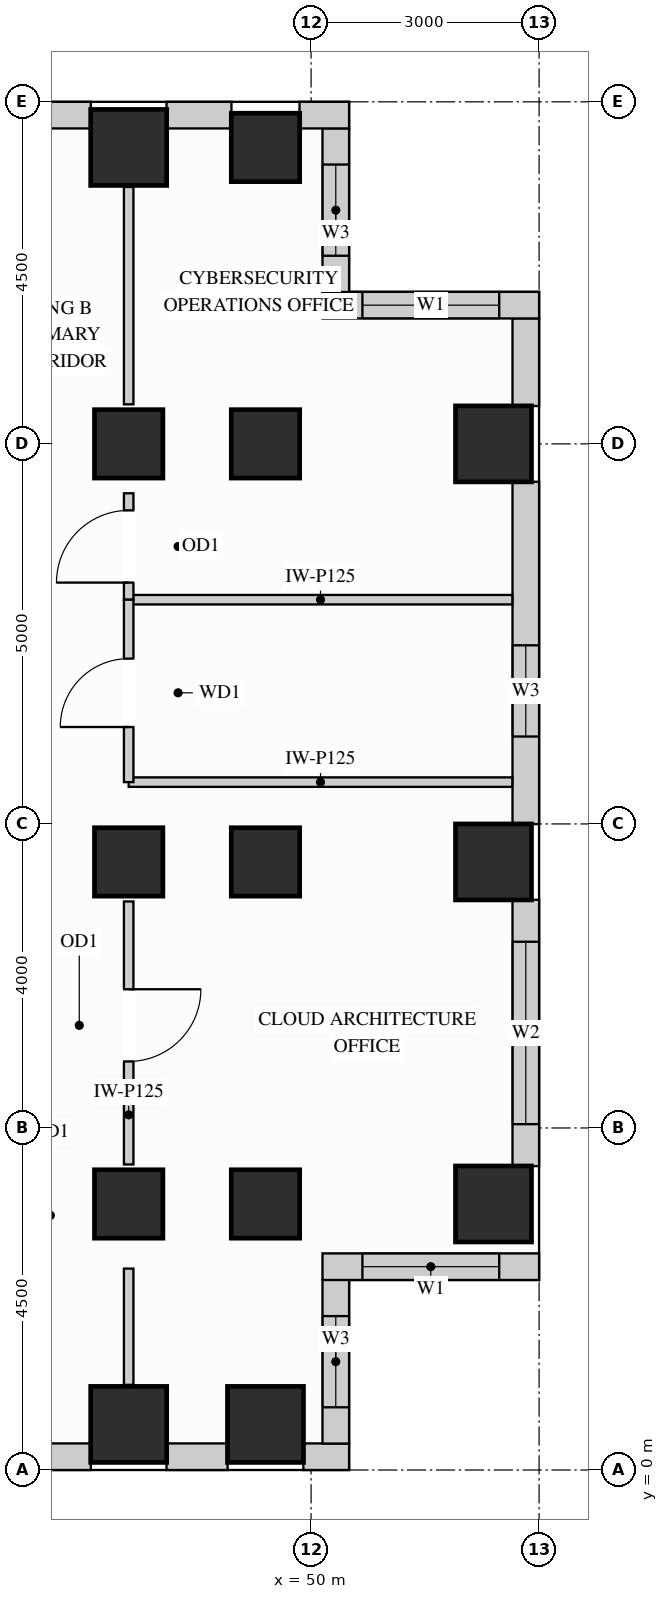
"""IFC4 building model, lengths in metres.
Left out: names, types, materials, properties, quantities, classifications, styles, units other than length and angle.
Written with IfcOpenShell. Run it as: python <this file> out.ifc"""

import sys

from ifc_helpers import new_model, si_unit, direction, frame, frame_2d, origin, origin_2d, place, context, subcontext, project, spatial, rectangle, extrude, source, transform, mapped, element, fill, save


model = new_model("IFC4")
c1 = context("Model", 3, precision=1e-05, world=origin(), true_north=direction((0.0, 1.0)))
c2 = subcontext(c1, "Body", "Model", "MODEL_VIEW")
j1 = project(units=[si_unit("LENGTHUNIT", "METRE"), si_unit("PLANEANGLEUNIT", "RADIAN")], contexts=[c1])
p1 = place(None, origin())
s1 = spatial("IfcSite", under=j1, at=p1, CompositionType="ELEMENT")
p2 = place(p1, origin())
s2 = spatial("IfcBuilding", under=s1, at=p2, CompositionType="ELEMENT")
p3 = place(p2, frame((0.0, 0.0, 168.3)))
s3 = spatial("IfcBuildingStorey", under=s2, at=p3, CompositionType="ELEMENT", Elevation=168.3)
m1 = source(origin(), c2, "Body", "SweptSolid", [
    extrude(rectangle(XDim=0.9, YDim=0.9, at=origin_2d()), origin(), (0.0, 0.0, 1.0), 3.4),
])
for number, where, z_axis, x_axis in (
    (1, (47.6, 13.5, 0.0), (0.0, 0.0, 1.0), (1.0, 0.0, 0.0)),
    (2, (47.6, 3.5, 0.0), (0.0, 0.0, 1.0), (1.0, 0.0, 0.0)),
    (3, (47.6, 8.0, 0.0), (0.0, 0.0, 1.0), (1.0, 0.0, 0.0)),
    (4, (49.4, 13.5, 0.0), (0.0, 0.0, 1.0), (1.0, 0.0, 0.0)),
    (5, (49.4, 17.4, 0.0), (0.0, 0.0, 1.0), (1.0, 0.0, 0.0)),
    (6, (49.4, 3.5, 0.0), (0.0, 0.0, 1.0), (1.0, 0.0, 0.0)),
    (7, (49.4, 8.0, 0.0), (0.0, 0.0, 1.0), (1.0, 0.0, 0.0)),
):
    element("IfcColumn", number, at=place(p3, frame(where, z_axis=z_axis, x_axis=x_axis)), inside=s3, PredefinedType="COLUMN", context=c2, shape_type="MappedRepresentation", body=[
        mapped(m1, transform((0.0, 0.0, 0.0), x_axis=(1.0, 0.0, 0.0), y_axis=(0.0, 1.0, 0.0), z_axis=(0.0, 0.0, 1.0))),
    ])
m2 = source(origin(), c2, "Body", "SweptSolid", [
    extrude(rectangle(XDim=1.0, YDim=1.0, at=origin_2d()), origin(), (0.0, 0.0, 1.0), 3.4),
])
for number, where, z_axis, x_axis in (
    (8, (47.6, 17.4, 0.0), (0.0, 0.0, 1.0), (1.0, 0.0, 0.0)),
    (9, (52.4, 13.5, 0.0), (0.0, 0.0, 1.0), (1.0, 0.0, 0.0)),
    (10, (52.4, 3.5, 0.0), (0.0, 0.0, 1.0), (1.0, 0.0, 0.0)),
    (11, (52.4, 8.0, 0.0), (0.0, 0.0, 1.0), (1.0, 0.0, 0.0)),
    (12, (47.6, 0.6, 0.0), (0.0, 0.0, 1.0), (1.0, 0.0, 0.0)),
    (13, (49.4, 0.6, 0.0), (0.0, 0.0, 1.0), (1.0, 0.0, 0.0)),
):
    element("IfcColumn", number, at=place(p3, frame(where, z_axis=z_axis, x_axis=x_axis)), inside=s3, PredefinedType="COLUMN", context=c2, shape_type="MappedRepresentation", body=[
        mapped(m2, transform((0.0, 0.0, 0.0), x_axis=(1.0, 0.0, 0.0), y_axis=(0.0, 1.0, 0.0), z_axis=(0.0, 0.0, 1.0))),
    ])
p4 = place(p3, frame((40.498, 0.175, 0.0), z_axis=(0.0, 0.0, 1.0), x_axis=(1.0, 0.0, 0.0)))
e14 = element("IfcWall", 14, at=p4, inside=s3, PredefinedType="SOLIDWALL", context=c2, shape_type="SweptSolid", body=[
    extrude(rectangle(XDim=6.604, YDim=0.35, at=frame_2d((3.302, 0.0))), origin(), (0.0, 0.0, 1.0), 2.612),
])
p5 = place(p4, frame((0.737, 0.0, 0.78)))
e15 = element("IfcOpeningElement", 15, at=p5, cuts=e14, PredefinedType="OPENING", context=c2, shape_type="SweptSolid", body=[
    extrude(rectangle(XDim=1.8, YDim=1.652, at=frame_2d((0.9, 0.826))), frame((0.0, 0.185, 0.0), z_axis=(0.0, -1.0, 0.0), x_axis=(1.0, 0.0, 0.0)), (0.0, 0.0, 1.0), 0.37),
])
p6 = place(p4, frame((2.955, 0.0, 0.78)))
e16 = element("IfcOpeningElement", 16, at=p6, cuts=e14, PredefinedType="OPENING", context=c2, shape_type="SweptSolid", body=[
    extrude(rectangle(XDim=1.8, YDim=1.652, at=frame_2d((0.9, 0.826))), frame((0.0, 0.185, 0.0), z_axis=(0.0, -1.0, 0.0), x_axis=(1.0, 0.0, 0.0)), (0.0, 0.0, 1.0), 0.37),
])
m3 = source(origin(), c2, "Body", "SweptSolid", [
    extrude(rectangle(XDim=0.804, YDim=0.35, at=frame_2d((0.402, 0.0))), origin(), (0.0, 0.0, 1.0), 3.385),
])
p7 = place(p3, frame((48.098, 0.175, 0.0), z_axis=(0.0, 0.0, 1.0), x_axis=(1.0, 0.0, 0.0)))
e17 = element("IfcWall", 17, at=p7, inside=s3, PredefinedType="SOLIDWALL", context=c2, shape_type="MappedRepresentation", body=[
    mapped(m3, transform((0.0, 0.0, 0.0), x_axis=(1.0, 0.0, 0.0), y_axis=(0.0, 1.0, 0.0), z_axis=(0.0, 0.0, 1.0))),
])
m4 = source(origin(), c2, "Body", "SweptSolid", [
    extrude(rectangle(XDim=0.602, YDim=0.35, at=frame_2d((0.301, 0.0))), origin(), (0.0, 0.0, 1.0), 3.385),
])
p8 = place(p3, frame((49.898, 0.175, 0.0), z_axis=(0.0, 0.0, 1.0), x_axis=(1.0, 0.0, 0.0)))
e18 = element("IfcWall", 18, at=p8, inside=s3, PredefinedType="SOLIDWALL", context=c2, shape_type="MappedRepresentation", body=[
    mapped(m4, transform((0.0, 0.0, 0.0), x_axis=(1.0, 0.0, 0.0), y_axis=(0.0, 1.0, 0.0), z_axis=(0.0, 0.0, 1.0))),
])
p9 = place(p3, frame((50.325, 0.348, 0.0), z_axis=(0.0, 0.0, 1.0), x_axis=(0.0, 1.0, 0.0)))
e19 = element("IfcWall", 19, at=p9, inside=s3, PredefinedType="SOLIDWALL", context=c2, shape_type="SweptSolid", body=[
    extrude(rectangle(XDim=2.154, YDim=0.35, at=frame_2d((1.077, 0.0))), origin(), (0.0, 0.0, 1.0), 3.385),
])
p10 = place(p9, frame((0.477, 0.0, 0.78)))
e20 = element("IfcOpeningElement", 20, at=p10, cuts=e19, PredefinedType="OPENING", context=c2, shape_type="SweptSolid", body=[
    extrude(rectangle(XDim=1.2, YDim=2.1, at=frame_2d((0.6, 1.05))), frame((0.0, 0.185, 0.0), z_axis=(0.0, -1.0, 0.0), x_axis=(1.0, 0.0, 0.0)), (0.0, 0.0, 1.0), 0.37),
])
p11 = place(p3, frame((50.15, 2.675, 0.0), z_axis=(0.0, 0.0, 1.0), x_axis=(1.0, 0.0, 0.0)))
e21 = element("IfcWall", 21, at=p11, inside=s3, PredefinedType="SOLIDWALL", context=c2, shape_type="SweptSolid", body=[
    extrude(rectangle(XDim=2.85, YDim=0.35, at=frame_2d((1.425, 0.0))), origin(), (0.0, 0.0, 1.0), 3.385),
])
p12 = place(p11, frame((0.525, 0.0, 0.78)))
e22 = element("IfcOpeningElement", 22, at=p12, cuts=e21, PredefinedType="OPENING", context=c2, shape_type="SweptSolid", body=[
    extrude(rectangle(XDim=1.8, YDim=2.1, at=frame_2d((0.9, 1.05))), frame((0.0, 0.185, 0.0), z_axis=(0.0, -1.0, 0.0), x_axis=(1.0, 0.0, 0.0)), (0.0, 0.0, 1.0), 0.37),
])
p13 = place(p3, frame((52.825, 3.998, 0.0), z_axis=(0.0, 0.0, 1.0), x_axis=(0.0, 1.0, 0.0)))
e23 = element("IfcWall", 23, at=p13, inside=s3, PredefinedType="SOLIDWALL", context=c2, shape_type="SweptSolid", body=[
    extrude(rectangle(XDim=3.504, YDim=0.35, at=frame_2d((1.752, 0.0))), origin(), (0.0, 0.0, 1.0), 2.612),
])
p14 = place(p13, frame((0.552, 0.0, 0.78)))
e24 = element("IfcOpeningElement", 24, at=p14, cuts=e23, PredefinedType="OPENING", context=c2, shape_type="SweptSolid", body=[
    extrude(rectangle(XDim=2.4, YDim=1.652, at=frame_2d((1.2, 0.826))), frame((0.0, 0.185, 0.0), z_axis=(0.0, -1.0, 0.0), x_axis=(1.0, 0.0, 0.0)), (0.0, 0.0, 1.0), 0.37),
])
p15 = place(p3, frame((52.825, 8.498, 0.0), z_axis=(0.0, 0.0, 1.0), x_axis=(0.0, 1.0, 0.0)))
e25 = element("IfcWall", 25, at=p15, inside=s3, PredefinedType="SOLIDWALL", context=c2, shape_type="SweptSolid", body=[
    extrude(rectangle(XDim=4.504, YDim=0.35, at=frame_2d((2.252, 0.0))), origin(), (0.0, 0.0, 1.0), 2.612),
])
p16 = place(p15, frame((1.152, 0.0, 0.78)))
e26 = element("IfcOpeningElement", 26, at=p16, cuts=e25, PredefinedType="OPENING", context=c2, shape_type="SweptSolid", body=[
    extrude(rectangle(XDim=1.2, YDim=1.652, at=frame_2d((0.6, 0.826))), frame((0.0, 0.185, 0.0), z_axis=(0.0, -1.0, 0.0), x_axis=(1.0, 0.0, 0.0)), (0.0, 0.0, 1.0), 0.37),
])
m5 = source(origin(), c2, "Body", "SweptSolid", [
    extrude(rectangle(XDim=1.154, YDim=0.35, at=frame_2d((0.577, 0.0))), origin(), (0.0, 0.0, 1.0), 3.385),
])
p17 = place(p3, frame((52.825, 13.998, 0.0), z_axis=(0.0, 0.0, 1.0), x_axis=(0.0, 1.0, 0.0)))
e27 = element("IfcWall", 27, at=p17, inside=s3, PredefinedType="SOLIDWALL", context=c2, shape_type="MappedRepresentation", body=[
    mapped(m5, transform((0.0, 0.0, 0.0), x_axis=(1.0, 0.0, 0.0), y_axis=(0.0, 1.0, 0.0), z_axis=(0.0, 0.0, 1.0))),
])
p18 = place(p3, frame((53.0, 15.325, 0.0), z_axis=(0.0, 0.0, 1.0), x_axis=(-1.0, 0.0, 0.0)))
e28 = element("IfcWall", 28, at=p18, inside=s3, PredefinedType="SOLIDWALL", context=c2, shape_type="SweptSolid", body=[
    extrude(rectangle(XDim=2.85, YDim=0.35, at=frame_2d((1.425, 0.0))), origin(), (0.0, 0.0, 1.0), 3.385),
])
p19 = place(p18, frame((0.525, 0.0, 0.78)))
e29 = element("IfcOpeningElement", 29, at=p19, cuts=e28, PredefinedType="OPENING", context=c2, shape_type="SweptSolid", body=[
    extrude(rectangle(XDim=1.8, YDim=2.1, at=frame_2d((0.9, 1.05))), frame((0.0, 0.185, 0.0), z_axis=(0.0, -1.0, 0.0), x_axis=(1.0, 0.0, 0.0)), (0.0, 0.0, 1.0), 0.37),
])
p20 = place(p3, frame((50.325, 15.498, 0.0), z_axis=(0.0, 0.0, 1.0), x_axis=(0.0, 1.0, 0.0)))
e30 = element("IfcWall", 30, at=p20, inside=s3, PredefinedType="SOLIDWALL", context=c2, shape_type="SweptSolid", body=[
    extrude(rectangle(XDim=2.154, YDim=0.35, at=frame_2d((1.077, 0.0))), origin(), (0.0, 0.0, 1.0), 3.385),
])
p21 = place(p20, frame((0.477, 0.0, 0.78)))
e31 = element("IfcOpeningElement", 31, at=p21, cuts=e30, PredefinedType="OPENING", context=c2, shape_type="SweptSolid", body=[
    extrude(rectangle(XDim=1.2, YDim=2.1, at=frame_2d((0.6, 1.05))), frame((0.0, 0.185, 0.0), z_axis=(0.0, -1.0, 0.0), x_axis=(1.0, 0.0, 0.0)), (0.0, 0.0, 1.0), 0.37),
])
m6 = source(origin(), c2, "Body", "SweptSolid", [
    extrude(rectangle(XDim=0.652, YDim=0.35, at=frame_2d((0.326, 0.0))), origin(), (0.0, 0.0, 1.0), 3.385),
])
p22 = place(p3, frame((50.5, 17.825, 0.0), z_axis=(0.0, 0.0, 1.0), x_axis=(-1.0, 0.0, 0.0)))
e32 = element("IfcWall", 32, at=p22, inside=s3, PredefinedType="SOLIDWALL", context=c2, shape_type="MappedRepresentation", body=[
    mapped(m6, transform((0.0, 0.0, 0.0), x_axis=(1.0, 0.0, 0.0), y_axis=(0.0, 1.0, 0.0), z_axis=(0.0, 0.0, 1.0))),
])
m7 = source(origin(), c2, "Body", "SweptSolid", [
    extrude(rectangle(XDim=0.854, YDim=0.35, at=frame_2d((0.427, 0.0))), origin(), (0.0, 0.0, 1.0), 3.385),
])
p23 = place(p3, frame((48.952, 17.825, 0.0), z_axis=(0.0, 0.0, 1.0), x_axis=(-1.0, 0.0, 0.0)))
e33 = element("IfcWall", 33, at=p23, inside=s3, PredefinedType="SOLIDWALL", context=c2, shape_type="MappedRepresentation", body=[
    mapped(m7, transform((0.0, 0.0, 0.0), x_axis=(1.0, 0.0, 0.0), y_axis=(0.0, 1.0, 0.0), z_axis=(0.0, 0.0, 1.0))),
])
p24 = place(p3, frame((47.102, 17.825, 0.0), z_axis=(0.0, 0.0, 1.0), x_axis=(-1.0, 0.0, 0.0)))
e34 = element("IfcWall", 34, at=p24, inside=s3, PredefinedType="SOLIDWALL", context=c2, shape_type="SweptSolid", body=[
    extrude(rectangle(XDim=6.604, YDim=0.35, at=frame_2d((3.302, 0.0))), origin(), (0.0, 0.0, 1.0), 2.612),
])
p25 = place(p24, frame((1.849, 0.0, 0.78)))
e35 = element("IfcOpeningElement", 35, at=p25, cuts=e34, PredefinedType="OPENING", context=c2, shape_type="SweptSolid", body=[
    extrude(rectangle(XDim=1.8, YDim=1.652, at=frame_2d((0.9, 0.826))), frame((0.0, 0.185, 0.0), z_axis=(0.0, -1.0, 0.0), x_axis=(1.0, 0.0, 0.0)), (0.0, 0.0, 1.0), 0.37),
])
p26 = place(p24, frame((4.067, 0.0, 0.78)))
e36 = element("IfcOpeningElement", 36, at=p26, cuts=e34, PredefinedType="OPENING", context=c2, shape_type="SweptSolid", body=[
    extrude(rectangle(XDim=1.8, YDim=1.652, at=frame_2d((0.9, 0.826))), frame((0.0, 0.185, 0.0), z_axis=(0.0, -1.0, 0.0), x_axis=(1.0, 0.0, 0.0)), (0.0, 0.0, 1.0), 0.37),
])
m8 = source(origin(), c2, "Body", "SweptSolid", [
    extrude(rectangle(XDim=5.048, YDim=0.125, at=frame_2d((2.524, 0.0))), origin(), (0.0, 0.0, 1.0), 3.385),
])
for number, where, z_axis, x_axis in (
    (37, (47.6, 11.45, 0.0), (0.0, 0.0, 1.0), (1.0, 0.0, 0.0)),
    (38, (47.6, 9.05, 0.0), (0.0, 0.0, 1.0), (1.0, 0.0, 0.0)),
):
    element("IfcWall", number, at=place(p3, frame(where, z_axis=z_axis, x_axis=x_axis)), inside=s3, PredefinedType="PARTITIONING", context=c2, shape_type="MappedRepresentation", body=[
        mapped(m8, transform((0.0, 0.0, 0.0), x_axis=(1.0, 0.0, 0.0), y_axis=(0.0, 1.0, 0.0), z_axis=(0.0, 0.0, 1.0))),
    ])
p27 = place(p3, frame((47.6, 4.02, 0.0), z_axis=(0.0, 0.0, 1.0), x_axis=(0.0, 1.0, 0.0)))
e39 = element("IfcWall", 39, at=p27, inside=s3, PredefinedType="PARTITIONING", context=c2, shape_type="SweptSolid", body=[
    extrude(rectangle(XDim=3.46, YDim=0.125, at=frame_2d((1.73, 0.0))), origin(), (0.0, 0.0, 1.0), 2.773),
])
p28 = place(p27, frame((1.355, 0.0, 0.0)))
e40 = element("IfcOpeningElement", 40, at=p28, cuts=e39, PredefinedType="OPENING", context=c2, shape_type="SweptSolid", body=[
    extrude(rectangle(XDim=0.95, YDim=2.15, at=frame_2d((0.475, 1.075))), frame((0.0, 0.073, 0.0), z_axis=(0.0, -1.0, 0.0), x_axis=(1.0, 0.0, 0.0)), (0.0, 0.0, 1.0), 0.145),
])
m9 = source(origin(), c2, "Body", "SweptSolid", [
    extrude(rectangle(XDim=1.53, YDim=0.125, at=frame_2d((0.765, 0.0))), origin(), (0.0, 0.0, 1.0), 2.773),
])
p29 = place(p3, frame((47.6, 1.12, 0.0), z_axis=(0.0, 0.0, 1.0), x_axis=(0.0, 1.0, 0.0)))
e41 = element("IfcWall", 41, at=p29, inside=s3, PredefinedType="PARTITIONING", context=c2, shape_type="MappedRepresentation", body=[
    mapped(m9, transform((0.0, 0.0, 0.0), x_axis=(1.0, 0.0, 0.0), y_axis=(0.0, 1.0, 0.0), z_axis=(0.0, 0.0, 1.0))),
])
p30 = place(p3, frame((47.6, 11.45, 0.0), z_axis=(0.0, 0.0, 1.0), x_axis=(0.0, 1.0, 0.0)))
e42 = element("IfcWall", 42, at=p30, inside=s3, PredefinedType="PARTITIONING", context=c2, shape_type="SweptSolid", body=[
    extrude(rectangle(XDim=1.4, YDim=0.125, at=frame_2d((0.7, 0.0))), origin(), (0.0, 0.0, 1.0), 2.773),
])
p31 = place(p30, frame((0.225, 0.0, 0.0)))
e43 = element("IfcOpeningElement", 43, at=p31, cuts=e42, PredefinedType="OPENING", context=c2, shape_type="SweptSolid", body=[
    extrude(rectangle(XDim=0.95, YDim=2.15, at=frame_2d((0.475, 1.075))), frame((0.0, 0.073, 0.0), z_axis=(0.0, -1.0, 0.0), x_axis=(1.0, 0.0, 0.0)), (0.0, 0.0, 1.0), 0.145),
])
m10 = source(origin(), c2, "Body", "SweptSolid", [
    extrude(rectangle(XDim=2.86, YDim=0.125, at=frame_2d((1.43, 0.0))), origin(), (0.0, 0.0, 1.0), 2.773),
])
p32 = place(p3, frame((47.6, 14.02, 0.0), z_axis=(0.0, 0.0, 1.0), x_axis=(0.0, 1.0, 0.0)))
e44 = element("IfcWall", 44, at=p32, inside=s3, PredefinedType="PARTITIONING", context=c2, shape_type="MappedRepresentation", body=[
    mapped(m10, transform((0.0, 0.0, 0.0), x_axis=(1.0, 0.0, 0.0), y_axis=(0.0, 1.0, 0.0), z_axis=(0.0, 0.0, 1.0))),
])
p33 = place(p3, frame((47.6, 9.05, 0.0), z_axis=(0.0, 0.0, 1.0), x_axis=(0.0, 1.0, 0.0)))
e45 = element("IfcWall", 45, at=p33, inside=s3, PredefinedType="PARTITIONING", context=c2, shape_type="SweptSolid", body=[
    extrude(rectangle(XDim=2.4, YDim=0.125, at=frame_2d((1.2, 0.0))), origin(), (0.0, 0.0, 1.0), 2.773),
])
p34 = place(p33, frame((0.725, 0.0, 0.0)))
e46 = element("IfcOpeningElement", 46, at=p34, cuts=e45, PredefinedType="OPENING", context=c2, shape_type="SweptSolid", body=[
    extrude(rectangle(XDim=0.9, YDim=2.15, at=frame_2d((0.45, 1.075))), frame((0.0, 0.073, 0.0), z_axis=(0.0, -1.0, 0.0), x_axis=(1.0, 0.0, 0.0)), (0.0, 0.0, 1.0), 0.145),
])
m11 = source(origin(), c2, "Body", "SweptSolid", [
    extrude(rectangle(XDim=0.95, YDim=2.15, at=frame_2d((0.475, 1.075))), frame((0.0, 0.025, 0.0), z_axis=(0.0, -1.0, 0.0), x_axis=(1.0, 0.0, 0.0)), (0.0, 0.0, 1.0), 0.05),
])
p35 = place(p28, origin())
e47 = element("IfcDoor", 47, at=p35, inside=s3, OperationType="SINGLE_SWING_RIGHT", PredefinedType="DOOR", context=c2, shape_type="MappedRepresentation", body=[
    mapped(m11, transform((0.0, 0.0, 0.0), x_axis=(1.0, 0.0, 0.0), y_axis=(0.0, 1.0, 0.0), z_axis=(0.0, 0.0, 1.0))),
])
fill(e40, e47)
p36 = place(p31, origin())
e48 = element("IfcDoor", 48, at=p36, inside=s3, OperationType="SINGLE_SWING_LEFT", PredefinedType="DOOR", context=c2, shape_type="MappedRepresentation", body=[
    mapped(m11, transform((0.0, 0.0, 0.0), x_axis=(1.0, 0.0, 0.0), y_axis=(0.0, 1.0, 0.0), z_axis=(0.0, 0.0, 1.0))),
])
fill(e43, e48)
m12 = source(origin(), c2, "Body", "SweptSolid", [
    extrude(rectangle(XDim=0.9, YDim=2.15, at=frame_2d((0.45, 1.075))), frame((0.0, 0.025, 0.0), z_axis=(0.0, -1.0, 0.0), x_axis=(1.0, 0.0, 0.0)), (0.0, 0.0, 1.0), 0.05),
])
p37 = place(p34, origin())
e49 = element("IfcDoor", 49, at=p37, inside=s3, OperationType="SINGLE_SWING_LEFT", PredefinedType="DOOR", context=c2, shape_type="MappedRepresentation", body=[
    mapped(m12, transform((0.0, 0.0, 0.0), x_axis=(1.0, 0.0, 0.0), y_axis=(0.0, 1.0, 0.0), z_axis=(0.0, 0.0, 1.0))),
])
fill(e46, e49)
m13 = source(origin(), c2, "Body", "SweptSolid", [
    extrude(rectangle(XDim=1.8, YDim=2.1, at=frame_2d((0.9, 1.05))), frame((0.0, 0.03, 0.0), z_axis=(0.0, -1.0, 0.0), x_axis=(1.0, 0.0, 0.0)), (0.0, 0.0, 1.0), 0.06),
])
p38 = place(p12, origin())
e50 = element("IfcWindow", 50, at=p38, inside=s3, PartitioningType="SINGLE_PANEL", PredefinedType="WINDOW", context=c2, shape_type="MappedRepresentation", body=[
    mapped(m13, transform((0.0, 0.0, 0.0), x_axis=(1.0, 0.0, 0.0), y_axis=(0.0, 1.0, 0.0), z_axis=(0.0, 0.0, 1.0))),
])
fill(e22, e50)
p39 = place(p19, origin())
e51 = element("IfcWindow", 51, at=p39, inside=s3, PartitioningType="SINGLE_PANEL", PredefinedType="WINDOW", context=c2, shape_type="MappedRepresentation", body=[
    mapped(m13, transform((0.0, 0.0, 0.0), x_axis=(1.0, 0.0, 0.0), y_axis=(0.0, 1.0, 0.0), z_axis=(0.0, 0.0, 1.0))),
])
fill(e29, e51)
m14 = source(origin(), c2, "Body", "SweptSolid", [
    extrude(rectangle(XDim=2.4, YDim=1.652, at=frame_2d((1.2, 0.826))), frame((0.0, 0.03, 0.0), z_axis=(0.0, -1.0, 0.0), x_axis=(1.0, 0.0, 0.0)), (0.0, 0.0, 1.0), 0.06),
])
p40 = place(p14, origin())
e52 = element("IfcWindow", 52, at=p40, inside=s3, PartitioningType="SINGLE_PANEL", PredefinedType="WINDOW", context=c2, shape_type="MappedRepresentation", body=[
    mapped(m14, transform((0.0, 0.0, 0.0), x_axis=(1.0, 0.0, 0.0), y_axis=(0.0, 1.0, 0.0), z_axis=(0.0, 0.0, 1.0))),
])
fill(e24, e52)
m15 = source(origin(), c2, "Body", "SweptSolid", [
    extrude(rectangle(XDim=1.2, YDim=2.1, at=frame_2d((0.6, 1.05))), frame((0.0, 0.03, 0.0), z_axis=(0.0, -1.0, 0.0), x_axis=(1.0, 0.0, 0.0)), (0.0, 0.0, 1.0), 0.06),
])
p41 = place(p10, origin())
e53 = element("IfcWindow", 53, at=p41, inside=s3, PartitioningType="SINGLE_PANEL", PredefinedType="WINDOW", context=c2, shape_type="MappedRepresentation", body=[
    mapped(m15, transform((0.0, 0.0, 0.0), x_axis=(1.0, 0.0, 0.0), y_axis=(0.0, 1.0, 0.0), z_axis=(0.0, 0.0, 1.0))),
])
fill(e20, e53)
m16 = source(origin(), c2, "Body", "SweptSolid", [
    extrude(rectangle(XDim=1.2, YDim=1.652, at=frame_2d((0.6, 0.826))), frame((0.0, 0.03, 0.0), z_axis=(0.0, -1.0, 0.0), x_axis=(1.0, 0.0, 0.0)), (0.0, 0.0, 1.0), 0.06),
])
p42 = place(p16, origin())
e54 = element("IfcWindow", 54, at=p42, inside=s3, PartitioningType="SINGLE_PANEL", PredefinedType="WINDOW", context=c2, shape_type="MappedRepresentation", body=[
    mapped(m16, transform((0.0, 0.0, 0.0), x_axis=(1.0, 0.0, 0.0), y_axis=(0.0, 1.0, 0.0), z_axis=(0.0, 0.0, 1.0))),
])
fill(e26, e54)
p43 = place(p21, origin())
e55 = element("IfcWindow", 55, at=p43, inside=s3, PartitioningType="SINGLE_PANEL", PredefinedType="WINDOW", context=c2, shape_type="MappedRepresentation", body=[
    mapped(m15, transform((0.0, 0.0, 0.0), x_axis=(1.0, 0.0, 0.0), y_axis=(0.0, 1.0, 0.0), z_axis=(0.0, 0.0, 1.0))),
])
fill(e31, e55)
save(model, sys.argv[1])
